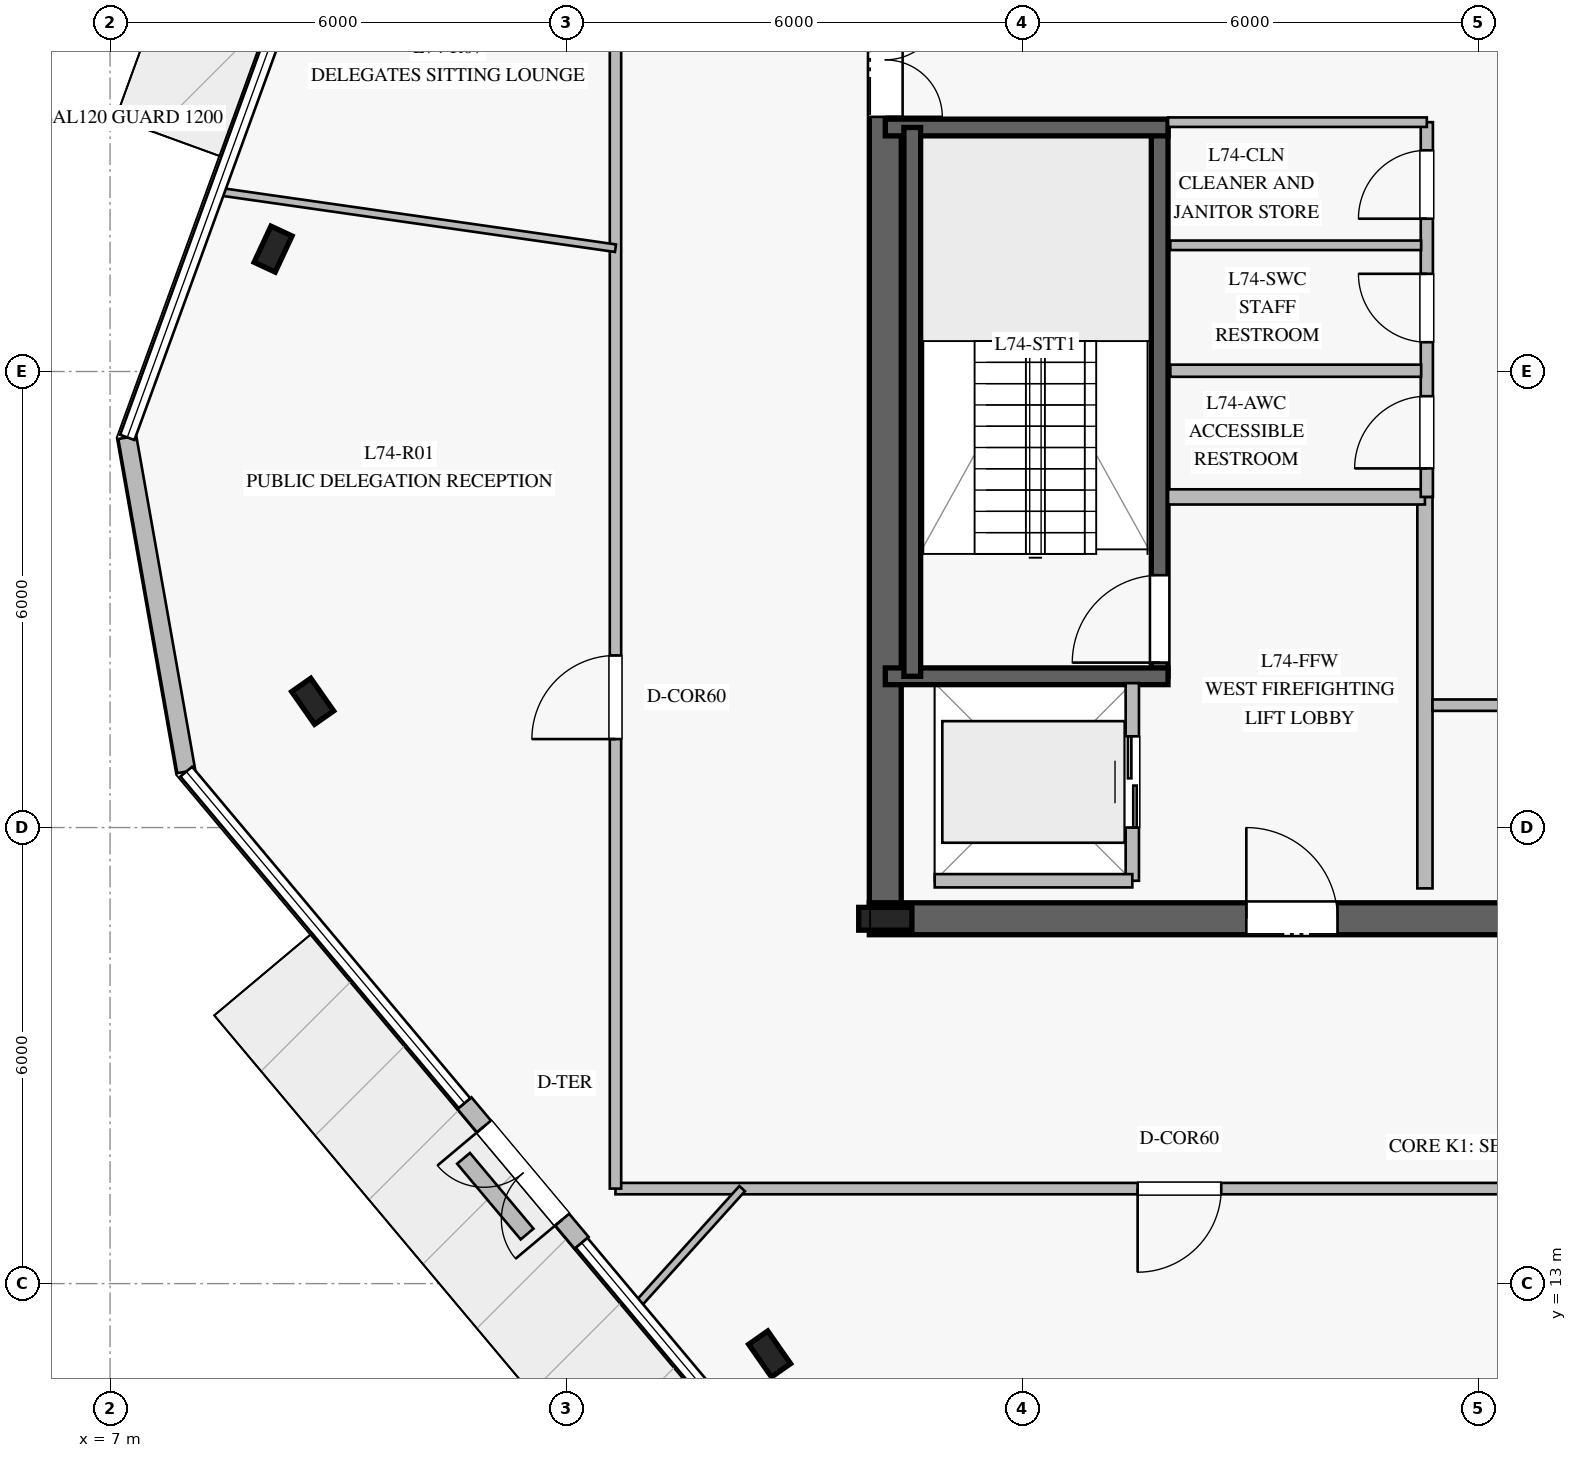
"""IFC4 building model, lengths in metres.
Left out: names, types, materials, properties, quantities, classifications, styles, units other than length and angle.
Written with IfcOpenShell. Run it as: python <this file> out.ifc"""

import sys

from ifc_helpers import new_model, si_unit, direction, frame, frame_2d, origin, origin_2d, place, context, subcontext, project, spatial, rectangle, i_section, extrude, element, fill, save


model = new_model("IFC4")
c1 = context("Model", 3, precision=1e-05, world=origin(), true_north=direction((0.0, 1.0)))
c2 = subcontext(c1, "Body", "Model", "MODEL_VIEW")
j1 = project(units=[si_unit("LENGTHUNIT", "METRE"), si_unit("PLANEANGLEUNIT", "RADIAN")], contexts=[c1])
p1 = place(None, origin())
s1 = spatial("IfcSite", under=j1, at=p1, CompositionType="ELEMENT")
p2 = place(p1, origin())
s2 = spatial("IfcBuilding", under=s1, at=p2, CompositionType="ELEMENT")
p3 = place(p2, frame((0.0, 0.0, 306.2)))
s3 = spatial("IfcBuildingStorey", under=s2, at=p3, CompositionType="ELEMENT", Elevation=306.2)
p4 = place(p3, frame((16.99, 17.8, 0.0), z_axis=(0.0, 0.0, 1.0), x_axis=(1.0, 0.0, 0.0)))
e1 = element("IfcWall", 1, at=p4, inside=s3, PredefinedType="SHEAR", context=c2, shape_type="SweptSolid", body=[
    extrude(rectangle(XDim=16.02, YDim=0.42, at=frame_2d((8.01, 0.0))), origin(), (0.0, 0.0, 1.0), 3.78),
])
p5 = place(p4, frame((4.96, 0.0, 0.0)))
e2 = element("IfcOpeningElement", 2, at=p5, cuts=e1, PredefinedType="OPENING", context=c2, shape_type="SweptSolid", body=[
    extrude(rectangle(XDim=1.2, YDim=2.25, at=frame_2d((0.6, 1.125))), frame((0.0, 0.22, 0.0), z_axis=(0.0, -1.0, 0.0), x_axis=(1.0, 0.0, 0.0)), (0.0, 0.0, 1.0), 0.44),
])
p6 = place(p4, frame((13.91, 0.0, 0.0)))
e3 = element("IfcOpeningElement", 3, at=p6, cuts=e1, PredefinedType="OPENING", context=c2, shape_type="SweptSolid", body=[
    extrude(rectangle(XDim=0.9, YDim=2.1, at=frame_2d((0.45, 1.05))), frame((0.0, 0.22, 0.0), z_axis=(0.0, -1.0, 0.0), x_axis=(1.0, 0.0, 0.0)), (0.0, 0.0, 1.0), 0.44),
])
p7 = place(p4, frame((9.16, 0.0, 0.0)))
e4 = element("IfcOpeningElement", 4, at=p7, cuts=e1, PredefinedType="OPENING", context=c2, shape_type="SweptSolid", body=[
    extrude(rectangle(XDim=1.1, YDim=2.2, at=frame_2d((0.55, 1.1))), frame((0.0, 0.22, 0.0), z_axis=(0.0, -1.0, 0.0), x_axis=(1.0, 0.0, 0.0)), (0.0, 0.0, 1.0), 0.44),
])
p8 = place(p3, frame((17.2, 31.99, 0.0), z_axis=(0.0, 0.0, 1.0), x_axis=(0.0, -1.0, 0.0)))
e5 = element("IfcWall", 5, at=p8, inside=s3, PredefinedType="SHEAR", context=c2, shape_type="SweptSolid", body=[
    extrude(rectangle(XDim=13.98, YDim=0.42, at=frame_2d((6.99, 0.0))), origin(), (0.0, 0.0, 1.0), 3.78),
])
p9 = place(p8, frame((2.14, 0.0, 0.0)))
e6 = element("IfcOpeningElement", 6, at=p9, cuts=e5, PredefinedType="OPENING", context=c2, shape_type="SweptSolid", body=[
    extrude(rectangle(XDim=1.5, YDim=2.2, at=frame_2d((0.75, 1.1))), frame((0.0, 0.22, 0.0), z_axis=(0.0, -1.0, 0.0), x_axis=(1.0, 0.0, 0.0)), (0.0, 0.0, 1.0), 0.44),
])
p10 = place(p3, frame((17.2, 17.8, 0.0), z_axis=(0.0, 0.0, 1.0), x_axis=(1.0, 0.0, 0.0)))
e7 = element("IfcColumn", 7, at=p10, inside=s3, PredefinedType="COLUMN", context=c2, shape_type="SweptSolid", body=[
    extrude(i_section(OverallWidth=0.3, OverallDepth=0.7, WebThickness=0.017, FlangeThickness=0.032, at=origin_2d()), origin(), (0.0, 0.0, 1.0), 4.0),
])
p11 = place(p3, frame((20.81, 20.99, 0.0), z_axis=(0.0, 0.0, 1.0), x_axis=(0.0, 1.0, 0.0)))
e8 = element("IfcWall", 8, at=p11, inside=s3, PredefinedType="SOLIDWALL", context=c2, shape_type="SweptSolid", body=[
    extrude(rectangle(XDim=7.22, YDim=0.22, at=frame_2d((3.61, 0.0))), origin(), (0.0, 0.0, 1.0), 3.78),
])
p12 = place(p11, frame((0.18, 0.0, 0.0)))
e9 = element("IfcOpeningElement", 9, at=p12, cuts=e8, PredefinedType="OPENING", context=c2, shape_type="SweptSolid", body=[
    extrude(rectangle(XDim=1.15, YDim=2.2, at=frame_2d((0.575, 1.1))), frame((0.0, 0.12, 0.0), z_axis=(0.0, -1.0, 0.0), x_axis=(1.0, 0.0, 0.0)), (0.0, 0.0, 1.0), 0.24),
])
for number, where, z_axis, x_axis in (
    (10, (17.2, 20.99, 0.0), (0.0, 0.0, 1.0), (1.0, 0.0, 0.0)),
    (11, (17.2, 28.21, 0.0), (0.0, 0.0, 1.0), (1.0, 0.0, 0.0)),
):
    element("IfcWall", number, at=place(p3, frame(where, z_axis=z_axis, x_axis=x_axis)), inside=s3, PredefinedType="SOLIDWALL", context=c2, shape_type="SweptSolid", body=[
        extrude(rectangle(XDim=3.72, YDim=0.22, at=frame_2d((1.86, 0.0))), origin(), (0.0, 0.0, 1.0), 3.78),
    ])
p13 = place(p3, frame((17.555, 28.21, 0.0), z_axis=(0.0, 0.0, 1.0), x_axis=(0.0, -1.0, 0.0)))
e12 = element("IfcWall", 12, at=p13, inside=s3, PredefinedType="SOLIDWALL", context=c2, shape_type="SweptSolid", body=[
    extrude(rectangle(XDim=7.22, YDim=0.22, at=frame_2d((3.61, 0.0))), origin(), (0.0, 0.0, 1.0), 3.78),
])
for number, where, z_axis, x_axis in (
    (13, (9.145, 26.61, 0.0), (0.0, 0.0, 1.0), (0.423, 0.906, 0.0)),
    (14, (9.666, 20.661, 0.0), (0.0, 0.0, 1.0), (-0.574, 0.819, 0.0)),
    (15, (15.678, 12.074, 0.0), (0.0, 0.0, 1.0), (-0.574, 0.819, 0.0)),
):
    element("IfcColumn", number, at=place(p3, frame(where, z_axis=z_axis, x_axis=x_axis)), inside=s3, PredefinedType="COLUMN", context=c2, shape_type="SweptSolid", body=[
        extrude(i_section(OverallWidth=0.306, OverallDepth=0.524, WebThickness=0.021, FlangeThickness=0.04, at=origin_2d()), origin(), (0.0, 0.0, 1.0), 4.0),
    ])
p14 = place(p3, frame((7.227, 24.133, 0.0), z_axis=(0.0, 0.0, 1.0), x_axis=(0.173772856593, -0.984785760616, 0.0)))
e16 = element("IfcWall", 16, at=p14, inside=s3, PredefinedType="STANDARD", context=c2, shape_type="SweptSolid", body=[
    extrude(rectangle(XDim=4.465, YDim=0.24, at=frame_2d((2.232, 0.0))), origin(), (0.0, 0.0, 1.0), 3.78),
])
p15 = place(p3, frame((11.663, 15.374, 0.0), z_axis=(0.0, 0.0, 1.0), x_axis=(0.642693191064, -0.766123659836, 0.0)))
e17 = element("IfcWall", 17, at=p15, inside=s3, PredefinedType="STANDARD", context=c2, shape_type="SweptSolid", body=[
    extrude(rectangle(XDim=2.399, YDim=0.24, at=frame_2d((1.2, 0.0))), origin(), (0.0, 0.0, 1.0), 3.78),
])
p16 = place(p15, frame((0.4, 0.0, 0.0)))
e18 = element("IfcOpeningElement", 18, at=p16, cuts=e17, PredefinedType="OPENING", context=c2, shape_type="SweptSolid", body=[
    extrude(rectangle(XDim=1.6, YDim=2.25, at=frame_2d((0.8, 1.125))), frame((0.0, 0.13, 0.0), z_axis=(0.0, -1.0, 0.0), x_axis=(1.0, 0.0, 0.0)), (0.0, 0.0, 1.0), 0.26),
])
p17 = place(p3, frame((11.651, 14.648, 0.0), z_axis=(0.0, 0.0, 1.0), x_axis=(0.643042367604, -0.765830603637, 0.0)))
e19 = element("IfcWall", 19, at=p17, inside=s3, PredefinedType="USERDEFINED", context=c2, shape_type="SweptSolid", body=[
    extrude(rectangle(XDim=1.3, YDim=0.22, at=frame_2d((0.65, 0.0))), origin(), (0.0, 0.0, 1.0), 0.4),
])
p18 = place(p3, frame((24.3, 18.2, 0.0), z_axis=(0.0, 0.0, 1.0), x_axis=(0.0, 1.0, 0.0)))
e20 = element("IfcWall", 20, at=p18, inside=s3, PredefinedType="PARTITIONING", context=c2, shape_type="SweptSolid", body=[
    extrude(rectangle(XDim=5.15, YDim=0.2, at=frame_2d((2.575, 0.0))), origin(), (0.0, 0.0, 1.0), 3.78),
])
p19 = place(p3, frame((20.92, 23.35, 0.0), z_axis=(0.0, 0.0, 1.0), x_axis=(1.0, 0.0, 0.0)))
e21 = element("IfcWall", 21, at=p19, inside=s3, PredefinedType="PARTITIONING", context=c2, shape_type="SweptSolid", body=[
    extrude(rectangle(XDim=3.38, YDim=0.2, at=frame_2d((1.69, 0.0))), origin(), (0.0, 0.0, 1.0), 3.78),
])
p20 = place(p3, frame((24.325, 23.35, 0.0), z_axis=(0.0, 0.0, 1.0), x_axis=(0.0, 1.0, 0.0)))
e22 = element("IfcWall", 22, at=p20, inside=s3, PredefinedType="PLUMBINGWALL", context=c2, shape_type="SweptSolid", body=[
    extrude(rectangle(XDim=4.93, YDim=0.16, at=frame_2d((2.465, 0.0))), origin(), (0.0, 0.0, 1.0), 3.78),
])
p21 = place(p20, frame((0.375, 0.0, 0.0)))
e23 = element("IfcOpeningElement", 23, at=p21, cuts=e22, PredefinedType="OPENING", context=c2, shape_type="SweptSolid", body=[
    extrude(rectangle(XDim=0.95, YDim=2.1, at=frame_2d((0.475, 1.05))), frame((0.0, 0.09, 0.0), z_axis=(0.0, -1.0, 0.0), x_axis=(1.0, 0.0, 0.0)), (0.0, 0.0, 1.0), 0.18),
])
p22 = place(p20, frame((2.035, 0.0, 0.0)))
e24 = element("IfcOpeningElement", 24, at=p22, cuts=e22, PredefinedType="OPENING", context=c2, shape_type="SweptSolid", body=[
    extrude(rectangle(XDim=0.9, YDim=2.1, at=frame_2d((0.45, 1.05))), frame((0.0, 0.09, 0.0), z_axis=(0.0, -1.0, 0.0), x_axis=(1.0, 0.0, 0.0)), (0.0, 0.0, 1.0), 0.18),
])
p23 = place(p20, frame((3.66, 0.0, 0.0)))
e25 = element("IfcOpeningElement", 25, at=p23, cuts=e22, PredefinedType="OPENING", context=c2, shape_type="SweptSolid", body=[
    extrude(rectangle(XDim=0.9, YDim=2.1, at=frame_2d((0.45, 1.05))), frame((0.0, 0.09, 0.0), z_axis=(0.0, -1.0, 0.0), x_axis=(1.0, 0.0, 0.0)), (0.0, 0.0, 1.0), 0.18),
])
p24 = place(p3, frame((20.92, 28.28, 0.0), z_axis=(0.0, 0.0, 1.0), x_axis=(1.0, 0.0, 0.0)))
e26 = element("IfcWall", 26, at=p24, inside=s3, PredefinedType="PARTITIONING", context=c2, shape_type="SweptSolid", body=[
    extrude(rectangle(XDim=3.405, YDim=0.125, at=frame_2d((1.703, 0.0))), origin(), (0.0, 0.0, 1.0), 3.78),
])
p25 = place(p3, frame((20.95, 25.01, 0.0), z_axis=(0.0, 0.0, 1.0), x_axis=(1.0, 0.0, 0.0)))
e27 = element("IfcWall", 27, at=p25, inside=s3, PredefinedType="PLUMBINGWALL", context=c2, shape_type="SweptSolid", body=[
    extrude(rectangle(XDim=3.3, YDim=0.16, at=frame_2d((1.65, 0.0))), origin(), (0.0, 0.0, 1.0), 3.78),
])
p26 = place(p3, frame((20.95, 26.66, 0.0), z_axis=(0.0, 0.0, 1.0), x_axis=(1.0, 0.0, 0.0)))
e28 = element("IfcWall", 28, at=p26, inside=s3, PredefinedType="PARTITIONING", context=c2, shape_type="SweptSolid", body=[
    extrude(rectangle(XDim=3.3, YDim=0.125, at=frame_2d((1.65, 0.0))), origin(), (0.0, 0.0, 1.0), 3.78),
])
p27 = place(p3, frame((24.4, 20.61, 0.0), z_axis=(0.0, 0.0, 1.0), x_axis=(1.0, 0.0, 0.0)))
e29 = element("IfcWall", 29, at=p27, inside=s3, PredefinedType="PARTITIONING", context=c2, shape_type="SweptSolid", body=[
    extrude(rectangle(XDim=5.9, YDim=0.15, at=frame_2d((2.95, 0.0))), origin(), (0.0, 0.0, 1.0), 3.78),
])
p28 = place(p3, frame((20.45, 18.3, 0.0), z_axis=(0.0, 0.0, 1.0), x_axis=(0.0, 1.0, 0.0)))
e30 = element("IfcWall", 30, at=p28, inside=s3, PredefinedType="PARTITIONING", context=c2, shape_type="SweptSolid", body=[
    extrude(rectangle(XDim=2.6, YDim=0.175, at=frame_2d((1.3, 0.0))), origin(), (0.0, 0.0, 1.0), 3.78),
])
p29 = place(p28, frame((0.7, 0.0, 0.0)))
e31 = element("IfcOpeningElement", 31, at=p29, cuts=e30, PredefinedType="OPENING", context=c2, shape_type="SweptSolid", body=[
    extrude(rectangle(XDim=1.2, YDim=2.2, at=frame_2d((0.6, 1.1))), frame((0.0, 0.098, 0.0), z_axis=(0.0, -1.0, 0.0), x_axis=(1.0, 0.0, 0.0)), (0.0, 0.0, 1.0), 0.195),
])
p30 = place(p3, frame((17.85, 18.3, 0.0), z_axis=(0.0, 0.0, 1.0), x_axis=(1.0, 0.0, 0.0)))
e32 = element("IfcWall", 32, at=p30, inside=s3, PredefinedType="PARTITIONING", context=c2, shape_type="SweptSolid", body=[
    extrude(rectangle(XDim=2.6, YDim=0.175, at=frame_2d((1.3, 0.0))), origin(), (0.0, 0.0, 1.0), 3.78),
])
p31 = place(p3, frame((36.35, 14.25, 0.0), z_axis=(0.0, 0.0, 1.0), x_axis=(-1.0, 0.0, 0.0)))
e33 = element("IfcWall", 33, at=p31, inside=s3, PredefinedType="PARTITIONING", context=c2, shape_type="SweptSolid", body=[
    extrude(rectangle(XDim=22.7, YDim=0.15, at=frame_2d((11.35, 0.0))), origin(), (0.0, 0.0, 1.0), 3.28),
])
p32 = place(p31, frame((14.73, 0.0, 0.0)))
e34 = element("IfcOpeningElement", 34, at=p32, cuts=e33, PredefinedType="OPENING", context=c2, shape_type="SweptSolid", body=[
    extrude(rectangle(XDim=1.1, YDim=2.2, at=frame_2d((0.55, 1.1))), frame((0.0, 0.085, 0.0), z_axis=(0.0, -1.0, 0.0), x_axis=(1.0, 0.0, 0.0)), (0.0, 0.0, 1.0), 0.17),
])
p33 = place(p3, frame((13.65, 14.25, 0.0), z_axis=(0.0, 0.0, 1.0), x_axis=(0.0, 1.0, 0.0)))
e35 = element("IfcWall", 35, at=p33, inside=s3, PredefinedType="PARTITIONING", context=c2, shape_type="SweptSolid", body=[
    extrude(rectangle(XDim=21.5, YDim=0.15, at=frame_2d((10.75, 0.0))), origin(), (0.0, 0.0, 1.0), 3.25),
])
p34 = place(p33, frame((5.914, 0.0, 0.0)))
e36 = element("IfcOpeningElement", 36, at=p34, cuts=e35, PredefinedType="OPENING", context=c2, shape_type="SweptSolid", body=[
    extrude(rectangle(XDim=1.1, YDim=2.2, at=frame_2d((0.55, 1.1))), frame((0.0, 0.085, 0.0), z_axis=(0.0, -1.0, 0.0), x_axis=(1.0, 0.0, 0.0)), (0.0, 0.0, 1.0), 0.17),
])
p35 = place(p3, frame((13.65, 26.622, 0.0), z_axis=(0.0, 0.0, 1.0), x_axis=(-0.989949493661, 0.141421356237, 0.0)))
e37 = element("IfcWall", 37, at=p35, inside=s3, PredefinedType="MOVABLE", context=c2, shape_type="SweptSolid", body=[
    extrude(rectangle(XDim=5.281, YDim=0.1, at=frame_2d((2.64, 0.0))), origin(), (0.0, 0.0, 1.0), 3.28),
])
p36 = place(p3, frame((15.317, 14.25, 0.0), z_axis=(0.0, 0.0, 1.0), x_axis=(-0.669366537032, -0.742932324712, 0.0)))
e38 = element("IfcWall", 38, at=p36, inside=s3, PredefinedType="MOVABLE", context=c2, shape_type="SweptSolid", body=[
    extrude(rectangle(XDim=2.081, YDim=0.1, at=frame_2d((1.041, 0.0))), origin(), (0.0, 0.0, 1.0), 3.28),
])
p37 = place(p16, frame((1.6, 0.0, 0.0), z_axis=(0.0, 0.0, 1.0), x_axis=(-1.0, 0.0, 0.0)))
e39 = element("IfcDoor", 39, at=p37, inside=s3, OperationType="DOUBLE_DOOR_SINGLE_SWING", PredefinedType="DOOR", context=c2, shape_type="SweptSolid", body=[
    extrude(rectangle(XDim=1.6, YDim=2.25, at=frame_2d((0.8, 1.125))), frame((0.0, 0.025, 0.0), z_axis=(0.0, -1.0, 0.0), x_axis=(1.0, 0.0, 0.0)), (0.0, 0.0, 1.0), 0.05),
])
fill(e18, e39)
p38 = place(p12, origin())
e40 = element("IfcDoor", 40, at=p38, inside=s3, OperationType="SINGLE_SWING_LEFT", PredefinedType="DOOR", context=c2, shape_type="SweptSolid", body=[
    extrude(rectangle(XDim=1.15, YDim=2.2, at=frame_2d((0.575, 1.1))), frame((0.0, 0.025, 0.0), z_axis=(0.0, -1.0, 0.0), x_axis=(1.0, 0.0, 0.0)), (0.0, 0.0, 1.0), 0.05),
])
fill(e9, e40)
p39 = place(p5, origin())
e41 = element("IfcDoor", 41, at=p39, inside=s3, OperationType="SINGLE_SWING_LEFT", PredefinedType="DOOR", context=c2, shape_type="SweptSolid", body=[
    extrude(rectangle(XDim=1.2, YDim=2.25, at=frame_2d((0.6, 1.125))), frame((0.0, 0.025, 0.0), z_axis=(0.0, -1.0, 0.0), x_axis=(1.0, 0.0, 0.0)), (0.0, 0.0, 1.0), 0.05),
])
fill(e2, e41)
p40 = place(p9, origin())
e42 = element("IfcDoor", 42, at=p40, inside=s3, OperationType="DOUBLE_DOOR_SINGLE_SWING", PredefinedType="DOOR", context=c2, shape_type="SweptSolid", body=[
    extrude(rectangle(XDim=1.5, YDim=2.2, at=frame_2d((0.75, 1.1))), frame((0.0, 0.025, 0.0), z_axis=(0.0, -1.0, 0.0), x_axis=(1.0, 0.0, 0.0)), (0.0, 0.0, 1.0), 0.05),
])
fill(e6, e42)
p41 = place(p21, origin())
e43 = element("IfcDoor", 43, at=p41, inside=s3, OperationType="SINGLE_SWING_LEFT", PredefinedType="DOOR", context=c2, shape_type="SweptSolid", body=[
    extrude(rectangle(XDim=0.95, YDim=2.1, at=frame_2d((0.475, 1.05))), frame((0.0, 0.025, 0.0), z_axis=(0.0, -1.0, 0.0), x_axis=(1.0, 0.0, 0.0)), (0.0, 0.0, 1.0), 0.05),
])
fill(e23, e43)
p42 = place(p22, origin())
e44 = element("IfcDoor", 44, at=p42, inside=s3, OperationType="SINGLE_SWING_RIGHT", PredefinedType="DOOR", context=c2, shape_type="SweptSolid", body=[
    extrude(rectangle(XDim=0.9, YDim=2.1, at=frame_2d((0.45, 1.05))), frame((0.0, 0.025, 0.0), z_axis=(0.0, -1.0, 0.0), x_axis=(1.0, 0.0, 0.0)), (0.0, 0.0, 1.0), 0.05),
])
fill(e24, e44)
p43 = place(p23, origin())
e45 = element("IfcDoor", 45, at=p43, inside=s3, OperationType="SINGLE_SWING_LEFT", PredefinedType="DOOR", context=c2, shape_type="SweptSolid", body=[
    extrude(rectangle(XDim=0.9, YDim=2.1, at=frame_2d((0.45, 1.05))), frame((0.0, 0.025, 0.0), z_axis=(0.0, -1.0, 0.0), x_axis=(1.0, 0.0, 0.0)), (0.0, 0.0, 1.0), 0.05),
])
fill(e25, e45)
p44 = place(p29, origin())
e46 = element("IfcDoor", 46, at=p44, inside=s3, OperationType="DOUBLE_DOOR_SLIDING", PredefinedType="DOOR", context=c2, shape_type="SweptSolid", body=[
    extrude(rectangle(XDim=1.2, YDim=2.2, at=frame_2d((0.6, 1.1))), frame((0.0, 0.025, 0.0), z_axis=(0.0, -1.0, 0.0), x_axis=(1.0, 0.0, 0.0)), (0.0, 0.0, 1.0), 0.05),
])
fill(e31, e46)
p45 = place(p34, origin())
e47 = element("IfcDoor", 47, at=p45, inside=s3, OperationType="SINGLE_SWING_LEFT", PredefinedType="DOOR", context=c2, shape_type="SweptSolid", body=[
    extrude(rectangle(XDim=1.1, YDim=2.2, at=frame_2d((0.55, 1.1))), frame((0.0, 0.025, 0.0), z_axis=(0.0, -1.0, 0.0), x_axis=(1.0, 0.0, 0.0)), (0.0, 0.0, 1.0), 0.05),
])
fill(e36, e47)
p46 = place(p32, origin())
e48 = element("IfcDoor", 48, at=p46, inside=s3, OperationType="SINGLE_SWING_RIGHT", PredefinedType="DOOR", context=c2, shape_type="SweptSolid", body=[
    extrude(rectangle(XDim=1.1, YDim=2.2, at=frame_2d((0.55, 1.1))), frame((0.0, 0.025, 0.0), z_axis=(0.0, -1.0, 0.0), x_axis=(1.0, 0.0, 0.0)), (0.0, 0.0, 1.0), 0.05),
])
fill(e34, e48)
save(model, sys.argv[1])
